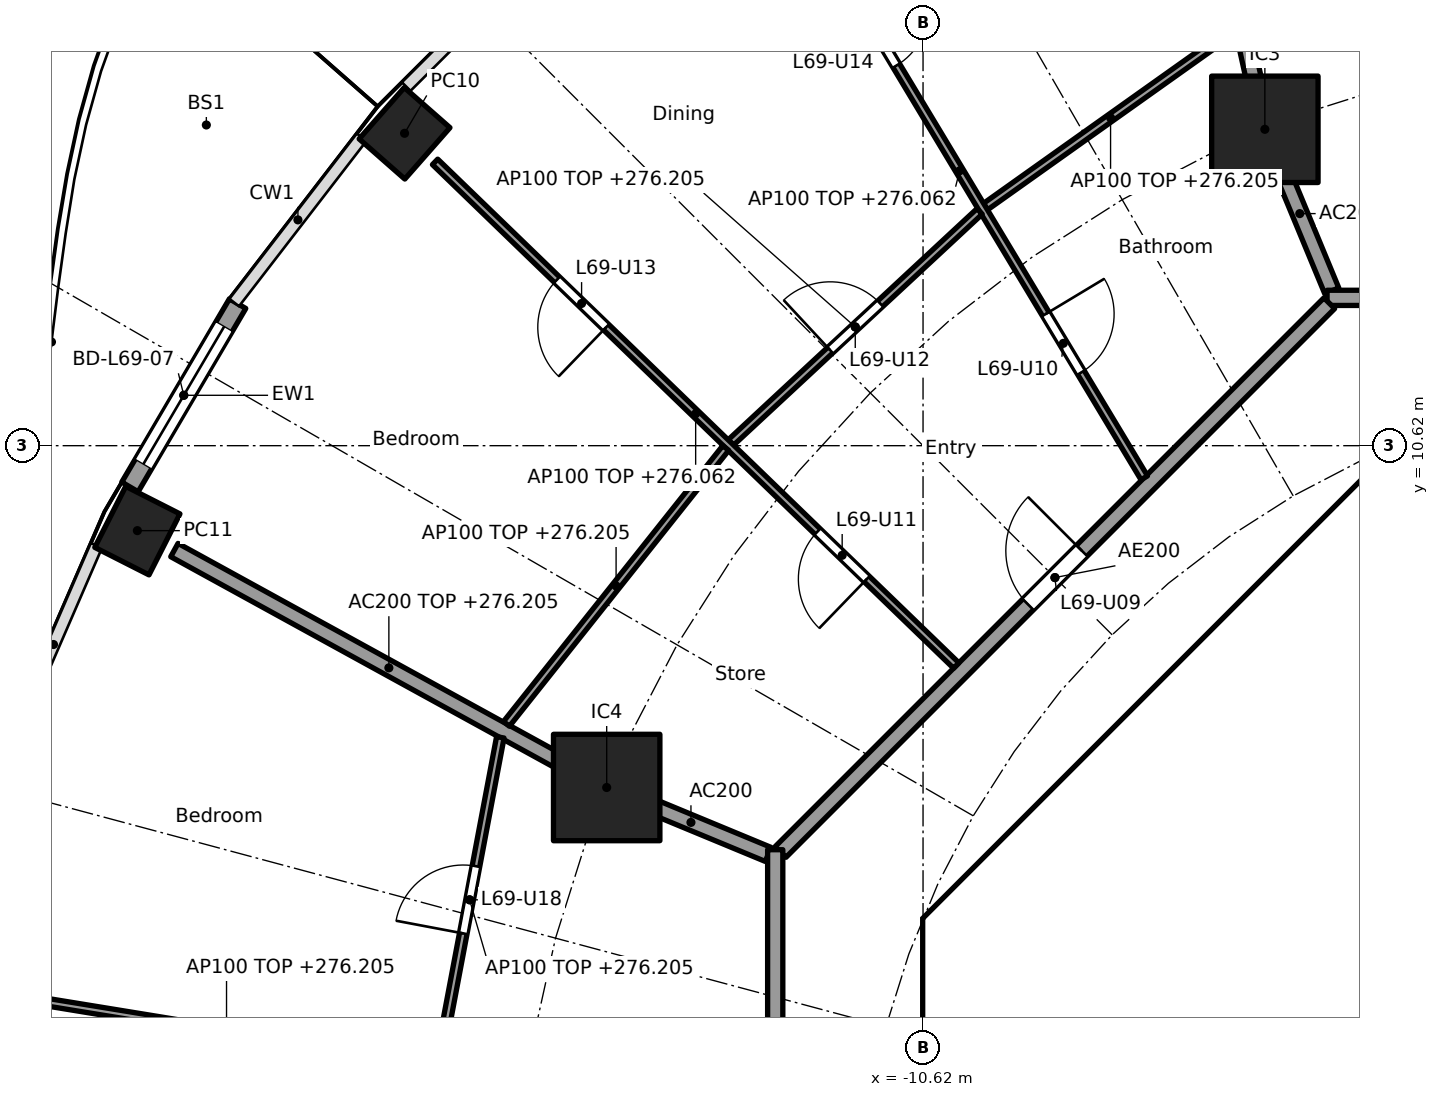
"""IFC4 building model, lengths in metres.
Left out: names, types, materials, properties, quantities, classifications, styles, units other than length and angle.
Written with IfcOpenShell. Run it as: python <this file> out.ifc"""

import sys

from ifc_helpers import new_model, si_unit, direction, frame, frame_2d, origin, origin_2d, place, context, subcontext, project, spatial, polyline, rectangle, hollow_rectangle, outline, extrude, element, fill, save


model = new_model("IFC4")
c1 = context("Model", 3, precision=1e-05, world=origin(), true_north=direction((0.0, 1.0)))
c2 = subcontext(c1, "Body", "Model", "MODEL_VIEW")
j1 = project(units=[si_unit("LENGTHUNIT", "METRE"), si_unit("PLANEANGLEUNIT", "RADIAN")], contexts=[c1])
p1 = place(None, origin())
s1 = spatial("IfcSite", under=j1, at=p1, CompositionType="ELEMENT")
p2 = place(p1, origin())
s2 = spatial("IfcBuilding", under=s1, at=p2, CompositionType="ELEMENT")
p3 = place(p2, frame((0.0, 0.0, 273.3)))
s3 = spatial("IfcBuildingStorey", under=s2, at=p3, CompositionType="ELEMENT", Elevation=273.3)
for number, where, z_axis, x_axis in (
    (1, (-17.441, 14.73, 0.0), (0.0, 0.0, 1.0), (-0.66, -0.751, 0.0)),
    (2, (-20.957, 9.502, 0.0), (0.0, 0.0, 1.0), (-0.452, -0.892, 0.0)),
):
    element("IfcColumn", number, at=place(p3, frame(where, z_axis=z_axis, x_axis=x_axis)), inside=s3, PredefinedType="COLUMN", context=c2, shape_type="SweptSolid", body=[
        extrude(hollow_rectangle(XDim=0.9, YDim=0.8, WallThickness=0.028, at=origin_2d()), origin(), (0.0, 0.0, 1.0), 3.7),
    ])
for number, where, z_axis, x_axis in (
    (3, (-6.123, 14.782, 0.0), (0.0, 0.0, 1.0), (1.0, 0.0, 0.0)),
    (4, (-14.782, 6.123, 0.0), (0.0, 0.0, 1.0), (1.0, 0.0, 0.0)),
):
    element("IfcColumn", number, at=place(p3, frame(where, z_axis=z_axis, x_axis=x_axis)), inside=s3, PredefinedType="COLUMN", context=c2, shape_type="SweptSolid", body=[
        extrude(rectangle(XDim=1.4, YDim=1.4, at=origin_2d()), origin(), (0.0, 0.0, 1.0), 3.7),
    ])
p4 = place(p3, frame((-21.054, 10.077, 0.0), z_axis=(0.0, 0.0, 1.0), x_axis=(0.506371364425, 0.862315511452, 0.0)))
e5 = element("IfcWall", 5, at=p4, inside=s3, PredefinedType="SOLIDWALL", context=c2, shape_type="SweptSolid", body=[
    extrude(rectangle(XDim=2.796, YDim=0.25, at=frame_2d((1.398, 0.0))), origin(), (0.0, 0.0, 1.0), 3.44),
])
p5 = place(p4, frame((0.348, 0.0, 0.0)))
e6 = element("IfcOpeningElement", 6, at=p5, cuts=e5, PredefinedType="OPENING", context=c2, shape_type="SweptSolid", body=[
    extrude(rectangle(XDim=2.1, YDim=2.4, at=frame_2d((1.05, 1.2))), frame((0.0, 0.135, 0.0), z_axis=(0.0, -1.0, 0.0), x_axis=(1.0, 0.0, 0.0)), (0.0, 0.0, 1.0), 0.27),
])
p6 = place(p3, frame((-4.613, 9.988, 0.0), z_axis=(0.0, 0.0, 1.0), x_axis=(-0.707106781187, -0.707106781187, 0.0)))
e7 = element("IfcWall", 7, at=p6, inside=s3, PredefinedType="SHEAR", context=c2, shape_type="SweptSolid", body=[
    extrude(rectangle(XDim=7.602, YDim=0.6, at=frame_2d((3.801, 0.0))), origin(), (0.0, 0.0, 1.0), 3.44),
])
p7 = place(p6, frame((0.351, 0.0, 0.0)))
e8 = element("IfcOpeningElement", 8, at=p7, cuts=e7, PredefinedType="OPENING", context=c2, shape_type="SweptSolid", body=[
    extrude(rectangle(XDim=1.1, YDim=2.1, at=frame_2d((0.55, 1.05))), frame((0.0, 0.31, 0.0), z_axis=(0.0, -1.0, 0.0), x_axis=(1.0, 0.0, 0.0)), (0.0, 0.0, 1.0), 0.62),
])
p8 = place(p3, frame((-10.325, 3.801, 0.0), z_axis=(0.0, 0.0, 1.0), x_axis=(0.0, -1.0, 0.0)))
e9 = element("IfcWall", 9, at=p8, inside=s3, PredefinedType="SHEAR", context=c2, shape_type="SweptSolid", body=[
    extrude(rectangle(XDim=7.602, YDim=0.6, at=frame_2d((3.801, 0.0))), origin(), (0.0, 0.0, 1.0), 3.44),
])
p9 = place(p8, frame((0.651, 0.0, 0.0)))
e10 = element("IfcOpeningElement", 10, at=p9, cuts=e9, PredefinedType="OPENING", context=c2, shape_type="SweptSolid", body=[
    extrude(rectangle(XDim=1.5, YDim=2.1, at=frame_2d((0.75, 1.05))), frame((0.0, 0.31, 0.0), z_axis=(0.0, -1.0, 0.0), x_axis=(1.0, 0.0, 0.0)), (0.0, 0.0, 1.0), 0.62),
])
p10 = place(p8, frame((5.451, 0.0, 0.0)))
e11 = element("IfcOpeningElement", 11, at=p10, cuts=e9, PredefinedType="OPENING", context=c2, shape_type="SweptSolid", body=[
    extrude(rectangle(XDim=1.5, YDim=2.1, at=frame_2d((0.75, 1.05))), frame((0.0, 0.31, 0.0), z_axis=(0.0, -1.0, 0.0), x_axis=(1.0, 0.0, 0.0)), (0.0, 0.0, 1.0), 0.62),
])
p11 = place(p3, frame((-5.8, 4.3, 0.0), z_axis=(0.0, 0.0, 1.0), x_axis=(0.0, 1.0, 0.0)))
e12 = element("IfcWall", 12, at=p11, inside=s3, PredefinedType="PARTITIONING", context=c2, shape_type="SweptSolid", body=[
    extrude(rectangle(XDim=3.927, YDim=0.15, at=frame_2d((1.963, 0.0))), origin(), (0.0, 0.0, 1.0), 3.44),
])
p12 = place(p11, frame((0.262, 0.0, 0.0)))
e13 = element("IfcOpeningElement", 13, at=p12, cuts=e12, PredefinedType="OPENING", context=c2, shape_type="SweptSolid", body=[
    extrude(rectangle(XDim=0.9, YDim=2.1, at=frame_2d((0.45, 1.05))), frame((0.0, 0.085, 0.0), z_axis=(0.0, -1.0, 0.0), x_axis=(1.0, 0.0, 0.0)), (0.0, 0.0, 1.0), 0.17),
])
p13 = place(p11, frame((2.338, 0.0, 0.0)))
e14 = element("IfcOpeningElement", 14, at=p13, cuts=e12, PredefinedType="OPENING", context=c2, shape_type="SweptSolid", body=[
    extrude(rectangle(XDim=0.9, YDim=2.1, at=frame_2d((0.45, 1.05))), frame((0.0, 0.085, 0.0), z_axis=(0.0, -1.0, 0.0), x_axis=(1.0, 0.0, 0.0)), (0.0, 0.0, 1.0), 0.17),
])
p14 = place(p3, origin())
e15 = element("IfcWall", 15, at=p14, inside=s3, PredefinedType="SHEAR", context=c2, shape_type="SweptSolid", body=[
    extrude(outline(polyline([(-10.2, 4.825), (-9.776, 4.401), (-10.025, 4.152), (-10.025, 3.801), (-10.625, 3.801), (-10.625, 4.401), (-10.2, 4.825)])), origin(), (0.0, 0.0, 1.0), 3.44),
])
p15 = place(p3, frame((-10.025, 4.0, 0.0), z_axis=(0.0, 0.0, 1.0), x_axis=(1.0, 0.0, 0.0)))
e16 = element("IfcWall", 16, at=p15, inside=s3, PredefinedType="PARTITIONING", context=c2, shape_type="SweptSolid", body=[
    extrude(rectangle(XDim=3.325, YDim=0.2, at=frame_2d((1.662, 0.0))), origin(), (0.0, 0.0, 1.0), 3.44),
])
p16 = place(p3, frame((-8.301, 5.8, 0.0), z_axis=(0.0, 0.0, 1.0), x_axis=(1.0, 0.0, 0.0)))
e17 = element("IfcWall", 17, at=p16, inside=s3, PredefinedType="PARTITIONING", context=c2, shape_type="SweptSolid", body=[
    extrude(rectangle(XDim=2.426, YDim=0.15, at=frame_2d((1.213, 0.0))), origin(), (0.0, 0.0, 1.0), 3.44),
])
p17 = place(p3, origin())
e18 = element("IfcWall", 18, at=p17, inside=s3, PredefinedType="SOLIDWALL", context=c2, shape_type="SweptSolid", body=[
    extrude(outline(polyline([(-6.7, 4.3), (6.7, 4.3), (6.7, 2.1), (6.5, 2.1), (6.5, 4.1), (4.5, 4.1), (4.5, 2.1), (4.3, 2.1), (4.3, 4.1), (2.3, 4.1), (2.3, 2.1), (2.1, 2.1), (2.1, 4.1), (0.1, 4.1), (0.1, 2.1), (-0.1, 2.1), (-0.1, 4.1), (-4.3, 4.1), (-4.3, 2.1), (-4.5, 2.1), (-4.5, 4.1), (-6.5, 4.1), (-6.5, 2.1), (-6.7, 2.1), (-6.7, 4.3)])), origin(), (0.0, 0.0, 1.0), 3.44),
])
p18 = place(p3, frame((-5.243, 12.657, 0.0), z_axis=(0.0, 0.0, 1.0), x_axis=(-0.38273085373, 0.923859888513, 0.0)))
e19 = element("IfcWall", 19, at=p18, inside=s3, PredefinedType="PARTITIONING", context=c2, shape_type="SweptSolid", body=[
    extrude(rectangle(XDim=2.199, YDim=0.2, at=frame_2d((1.1, 0.0))), origin(), (0.0, 0.0, 1.0), 3.44),
])
p19 = place(p3, frame((-6.134, 14.831, 0.0), z_axis=(0.0, 0.0, 1.0), x_axis=(-0.214842475666, 0.976648714047, 0.0)))
e20 = element("IfcWall", 20, at=p19, inside=s3, PredefinedType="PARTITIONING", context=c2, shape_type="SweptSolid", body=[
    extrude(rectangle(XDim=6.031, YDim=0.2, at=frame_2d((3.015, 0.0))), origin(), (0.0, 0.0, 1.0), 2.905),
])
p20 = place(p3, frame((-12.657, 5.243, 0.0), z_axis=(0.0, 0.0, 1.0), x_axis=(-0.923869415315, 0.382707856524, 0.0)))
e21 = element("IfcWall", 21, at=p20, inside=s3, PredefinedType="PARTITIONING", context=c2, shape_type="SweptSolid", body=[
    extrude(rectangle(XDim=2.2, YDim=0.2, at=frame_2d((1.1, 0.0))), origin(), (0.0, 0.0, 1.0), 3.44),
])
p21 = place(p3, frame((-14.826, 6.147, 0.0), z_axis=(0.0, 0.0, 1.0), x_axis=(-0.876484755865, 0.481429613481, 0.0)))
e22 = element("IfcWall", 22, at=p21, inside=s3, PredefinedType="PARTITIONING", context=c2, shape_type="SweptSolid", body=[
    extrude(rectangle(XDim=6.439, YDim=0.2, at=frame_2d((3.219, 0.0))), origin(), (0.0, 0.0, 1.0), 2.905),
])
p22 = place(p3, frame((5.104, 12.565, 0.0), z_axis=(0.0, 0.0, 1.0), x_axis=(-1.0, 0.0, 0.0)))
e23 = element("IfcWall", 23, at=p22, inside=s3, PredefinedType="PARTITIONING", context=c2, shape_type="SweptSolid", body=[
    extrude(rectangle(XDim=10.409, YDim=0.2, at=frame_2d((5.205, 0.0))), origin(), (0.0, 0.0, 1.0), 3.44),
])
p23 = place(p22, frame((4.604, 0.0, 0.0)))
e24 = element("IfcOpeningElement", 24, at=p23, cuts=e23, PredefinedType="OPENING", context=c2, shape_type="SweptSolid", body=[
    extrude(rectangle(XDim=1.0, YDim=2.1, at=frame_2d((0.5, 1.05))), frame((0.0, 0.11, 0.0), z_axis=(0.0, -1.0, 0.0), x_axis=(1.0, 0.0, 0.0)), (0.0, 0.0, 1.0), 0.22),
])
p24 = place(p3, frame((-5.275, 12.494, 0.0), z_axis=(0.0, 0.0, 1.0), x_axis=(-0.707106781187, -0.707106781187, 0.0)))
e25 = element("IfcWall", 25, at=p24, inside=s3, PredefinedType="PARTITIONING", context=c2, shape_type="SweptSolid", body=[
    extrude(rectangle(XDim=10.209, YDim=0.2, at=frame_2d((5.104, 0.0))), origin(), (0.0, 0.0, 1.0), 3.44),
])
p25 = place(p24, frame((4.604, 0.0, 0.0)))
e26 = element("IfcOpeningElement", 26, at=p25, cuts=e25, PredefinedType="OPENING", context=c2, shape_type="SweptSolid", body=[
    extrude(rectangle(XDim=1.0, YDim=2.1, at=frame_2d((0.5, 1.05))), frame((0.0, 0.11, 0.0), z_axis=(0.0, -1.0, 0.0), x_axis=(1.0, 0.0, 0.0)), (0.0, 0.0, 1.0), 0.22),
])
p26 = place(p3, frame((-12.565, 5.304, 0.0), z_axis=(0.0, 0.0, 1.0), x_axis=(0.0, -1.0, 0.0)))
e27 = element("IfcWall", 27, at=p26, inside=s3, PredefinedType="PARTITIONING", context=c2, shape_type="SweptSolid", body=[
    extrude(rectangle(XDim=10.409, YDim=0.2, at=frame_2d((5.205, 0.0))), origin(), (0.0, 0.0, 1.0), 3.44),
])
p27 = place(p26, frame((6.539, 0.0, 0.0)))
e28 = element("IfcOpeningElement", 28, at=p27, cuts=e27, PredefinedType="OPENING", context=c2, shape_type="SweptSolid", body=[
    extrude(rectangle(XDim=1.0, YDim=2.1, at=frame_2d((0.5, 1.05))), frame((0.0, 0.11, 0.0), z_axis=(0.0, -1.0, 0.0), x_axis=(1.0, 0.0, 0.0)), (0.0, 0.0, 1.0), 0.22),
])
p28 = place(p3, frame((-6.508, 16.103, 0.0), z_axis=(0.0, 0.0, 1.0), x_axis=(-0.815202203556, -0.579176456114, 0.0)))
e29 = element("IfcWall", 29, at=p28, inside=s3, PredefinedType="PARTITIONING", context=c2, shape_type="SweptSolid", body=[
    extrude(rectangle(XDim=4.036, YDim=0.1, at=frame_2d((2.018, 0.0))), origin(), (0.0, 0.0, 1.0), 2.905),
])
p29 = place(p3, frame((-7.709, 10.197, 0.0), z_axis=(0.0, 0.0, 1.0), x_axis=(-0.515516160663, 0.856879856278, 0.0)))
e30 = element("IfcWall", 30, at=p29, inside=s3, PredefinedType="PARTITIONING", context=c2, shape_type="SweptSolid", body=[
    extrude(rectangle(XDim=9.426, YDim=0.1, at=frame_2d((4.713, 0.0))), origin(), (0.0, 0.0, 1.0), 2.762),
])
p30 = place(p29, frame((1.615, 0.0, 0.0)))
e31 = element("IfcOpeningElement", 31, at=p30, cuts=e30, PredefinedType="OPENING", context=c2, shape_type="SweptSolid", body=[
    extrude(rectangle(XDim=0.9, YDim=2.1, at=frame_2d((0.45, 1.05))), frame((0.0, 0.06, 0.0), z_axis=(0.0, -1.0, 0.0), x_axis=(1.0, 0.0, 0.0)), (0.0, 0.0, 1.0), 0.12),
])
p31 = place(p29, frame((6.328, 0.0, 0.0)))
e32 = element("IfcOpeningElement", 32, at=p31, cuts=e30, PredefinedType="OPENING", context=c2, shape_type="SweptSolid", body=[
    extrude(rectangle(XDim=0.9, YDim=2.1, at=frame_2d((0.45, 1.05))), frame((0.0, 0.06, 0.0), z_axis=(0.0, -1.0, 0.0), x_axis=(1.0, 0.0, 0.0)), (0.0, 0.0, 1.0), 0.12),
])
p32 = place(p3, frame((-9.875, 13.702, 0.0), z_axis=(0.0, 0.0, 1.0), x_axis=(-0.732618266441, -0.680639754699, 0.0)))
e33 = element("IfcWall", 33, at=p32, inside=s3, PredefinedType="PARTITIONING", context=c2, shape_type="SweptSolid", body=[
    extrude(rectangle(XDim=4.467, YDim=0.1, at=frame_2d((2.233, 0.0))), origin(), (0.0, 0.0, 1.0), 2.905),
])
p33 = place(p32, frame((1.783, 0.0, 0.0)))
e34 = element("IfcOpeningElement", 34, at=p33, cuts=e33, PredefinedType="OPENING", context=c2, shape_type="SweptSolid", body=[
    extrude(rectangle(XDim=0.9, YDim=2.1, at=frame_2d((0.45, 1.05))), frame((0.0, 0.06, 0.0), z_axis=(0.0, -1.0, 0.0), x_axis=(1.0, 0.0, 0.0)), (0.0, 0.0, 1.0), 0.12),
])
p34 = place(p3, frame((-10.183, 7.727, 0.0), z_axis=(0.0, 0.0, 1.0), x_axis=(-0.719063433856, 0.694944442449, 0.0)))
e35 = element("IfcWall", 35, at=p34, inside=s3, PredefinedType="PARTITIONING", context=c2, shape_type="SweptSolid", body=[
    extrude(rectangle(XDim=9.535, YDim=0.1, at=frame_2d((4.768, 0.0))), origin(), (0.0, 0.0, 1.0), 2.762),
])
p35 = place(p34, frame((1.637, 0.0, 0.0)))
e36 = element("IfcOpeningElement", 36, at=p35, cuts=e35, PredefinedType="OPENING", context=c2, shape_type="SweptSolid", body=[
    extrude(rectangle(XDim=0.9, YDim=2.1, at=frame_2d((0.45, 1.05))), frame((0.0, 0.06, 0.0), z_axis=(0.0, -1.0, 0.0), x_axis=(1.0, 0.0, 0.0)), (0.0, 0.0, 1.0), 0.12),
])
p36 = place(p34, frame((6.405, 0.0, 0.0)))
e37 = element("IfcOpeningElement", 37, at=p36, cuts=e35, PredefinedType="OPENING", context=c2, shape_type="SweptSolid", body=[
    extrude(rectangle(XDim=0.9, YDim=2.1, at=frame_2d((0.45, 1.05))), frame((0.0, 0.06, 0.0), z_axis=(0.0, -1.0, 0.0), x_axis=(1.0, 0.0, 0.0)), (0.0, 0.0, 1.0), 0.12),
])
p37 = place(p3, frame((-13.216, 10.589, 0.0), z_axis=(0.0, 0.0, 1.0), x_axis=(-0.622251572882, -0.782817335045, 0.0)))
e38 = element("IfcWall", 38, at=p37, inside=s3, PredefinedType="PARTITIONING", context=c2, shape_type="SweptSolid", body=[
    extrude(rectangle(XDim=4.636, YDim=0.1, at=frame_2d((2.318, 0.0))), origin(), (0.0, 0.0, 1.0), 2.905),
])
p38 = place(p3, frame((-16.181, 6.783, 0.0), z_axis=(0.0, 0.0, 1.0), x_axis=(-0.185670583745, -0.982612046706, 0.0)))
e39 = element("IfcWall", 39, at=p38, inside=s3, PredefinedType="PARTITIONING", context=c2, shape_type="SweptSolid", body=[
    extrude(rectangle(XDim=4.351, YDim=0.1, at=frame_2d((2.176, 0.0))), origin(), (0.0, 0.0, 1.0), 2.905),
])
p39 = place(p38, frame((1.726, 0.0, 0.0)))
e40 = element("IfcOpeningElement", 40, at=p39, cuts=e39, PredefinedType="OPENING", context=c2, shape_type="SweptSolid", body=[
    extrude(rectangle(XDim=0.9, YDim=2.1, at=frame_2d((0.45, 1.05))), frame((0.0, 0.06, 0.0), z_axis=(0.0, -1.0, 0.0), x_axis=(1.0, 0.0, 0.0)), (0.0, 0.0, 1.0), 0.12),
])
p40 = place(p3, frame((-16.949, 2.451, 0.0), z_axis=(0.0, 0.0, 1.0), x_axis=(-0.986937570833, 0.161103169673, 0.0)))
e41 = element("IfcWall", 41, at=p40, inside=s3, PredefinedType="PARTITIONING", context=c2, shape_type="SweptSolid", body=[
    extrude(rectangle(XDim=5.743, YDim=0.1, at=frame_2d((2.872, 0.0))), origin(), (0.0, 0.0, 1.0), 2.905),
])
p41 = place(p5, origin())
e42 = element("IfcDoor", 42, at=p41, inside=s3, OperationType="SLIDING_TO_LEFT", PredefinedType="DOOR", context=c2, shape_type="SweptSolid", body=[
    extrude(rectangle(XDim=2.1, YDim=2.4, at=frame_2d((1.05, 1.2))), frame((0.0, 0.025, 0.0), z_axis=(0.0, -1.0, 0.0), x_axis=(1.0, 0.0, 0.0)), (0.0, 0.0, 1.0), 0.05),
])
fill(e6, e42)
p42 = place(p12, origin())
e43 = element("IfcDoor", 43, at=p42, inside=s3, OperationType="SINGLE_SWING_RIGHT", PredefinedType="DOOR", context=c2, shape_type="SweptSolid", body=[
    extrude(rectangle(XDim=0.9, YDim=2.1, at=frame_2d((0.45, 1.05))), frame((0.0, 0.025, 0.0), z_axis=(0.0, -1.0, 0.0), x_axis=(1.0, 0.0, 0.0)), (0.0, 0.0, 1.0), 0.05),
])
fill(e13, e43)
p43 = place(p13, origin())
e44 = element("IfcDoor", 44, at=p43, inside=s3, OperationType="SINGLE_SWING_RIGHT", PredefinedType="DOOR", context=c2, shape_type="SweptSolid", body=[
    extrude(rectangle(XDim=0.9, YDim=2.1, at=frame_2d((0.45, 1.05))), frame((0.0, 0.025, 0.0), z_axis=(0.0, -1.0, 0.0), x_axis=(1.0, 0.0, 0.0)), (0.0, 0.0, 1.0), 0.05),
])
fill(e14, e44)
p44 = place(p9, origin())
e45 = element("IfcDoor", 45, at=p44, inside=s3, OperationType="DOUBLE_DOOR_SINGLE_SWING", PredefinedType="DOOR", context=c2, shape_type="SweptSolid", body=[
    extrude(rectangle(XDim=1.5, YDim=2.1, at=frame_2d((0.75, 1.05))), frame((0.0, 0.025, 0.0), z_axis=(0.0, -1.0, 0.0), x_axis=(1.0, 0.0, 0.0)), (0.0, 0.0, 1.0), 0.05),
])
fill(e10, e45)
p45 = place(p7, origin())
e46 = element("IfcDoor", 46, at=p45, inside=s3, OperationType="SINGLE_SWING_RIGHT", PredefinedType="DOOR", context=c2, shape_type="SweptSolid", body=[
    extrude(rectangle(XDim=1.1, YDim=2.1, at=frame_2d((0.55, 1.05))), frame((0.0, 0.025, 0.0), z_axis=(0.0, -1.0, 0.0), x_axis=(1.0, 0.0, 0.0)), (0.0, 0.0, 1.0), 0.05),
])
fill(e8, e46)
p46 = place(p25, frame((1.0, 0.0, 0.0), x_axis=(-1.0, 0.0, 0.0)))
e47 = element("IfcDoor", 47, at=p46, inside=s3, OperationType="SINGLE_SWING_RIGHT", PredefinedType="DOOR", context=c2, shape_type="SweptSolid", body=[
    extrude(rectangle(XDim=1.0, YDim=2.1, at=frame_2d((0.5, 1.05))), frame((0.0, 0.025, 0.0), z_axis=(0.0, -1.0, 0.0), x_axis=(1.0, 0.0, 0.0)), (0.0, 0.0, 1.0), 0.05),
])
fill(e26, e47)
p47 = place(p30, frame((0.9, 0.0, 0.0), x_axis=(-1.0, 0.0, 0.0)))
e48 = element("IfcDoor", 48, at=p47, inside=s3, OperationType="SINGLE_SWING_LEFT", PredefinedType="DOOR", context=c2, shape_type="SweptSolid", body=[
    extrude(rectangle(XDim=0.9, YDim=2.1, at=frame_2d((0.45, 1.05))), frame((0.0, 0.025, 0.0), z_axis=(0.0, -1.0, 0.0), x_axis=(1.0, 0.0, 0.0)), (0.0, 0.0, 1.0), 0.05),
])
fill(e31, e48)
p48 = place(p35, origin())
e49 = element("IfcDoor", 49, at=p48, inside=s3, OperationType="SINGLE_SWING_LEFT", PredefinedType="DOOR", context=c2, shape_type="SweptSolid", body=[
    extrude(rectangle(XDim=0.9, YDim=2.1, at=frame_2d((0.45, 1.05))), frame((0.0, 0.025, 0.0), z_axis=(0.0, -1.0, 0.0), x_axis=(1.0, 0.0, 0.0)), (0.0, 0.0, 1.0), 0.05),
])
fill(e36, e49)
p49 = place(p33, frame((0.9, 0.0, 0.0), x_axis=(-1.0, 0.0, 0.0)))
e50 = element("IfcDoor", 50, at=p49, inside=s3, OperationType="SINGLE_SWING_LEFT", PredefinedType="DOOR", context=c2, shape_type="SweptSolid", body=[
    extrude(rectangle(XDim=0.9, YDim=2.1, at=frame_2d((0.45, 1.05))), frame((0.0, 0.025, 0.0), z_axis=(0.0, -1.0, 0.0), x_axis=(1.0, 0.0, 0.0)), (0.0, 0.0, 1.0), 0.05),
])
fill(e34, e50)
p50 = place(p36, origin())
e51 = element("IfcDoor", 51, at=p50, inside=s3, OperationType="SINGLE_SWING_LEFT", PredefinedType="DOOR", context=c2, shape_type="SweptSolid", body=[
    extrude(rectangle(XDim=0.9, YDim=2.1, at=frame_2d((0.45, 1.05))), frame((0.0, 0.025, 0.0), z_axis=(0.0, -1.0, 0.0), x_axis=(1.0, 0.0, 0.0)), (0.0, 0.0, 1.0), 0.05),
])
fill(e37, e51)
p51 = place(p31, frame((0.9, 0.0, 0.0), x_axis=(-1.0, 0.0, 0.0)))
e52 = element("IfcDoor", 52, at=p51, inside=s3, OperationType="SINGLE_SWING_LEFT", PredefinedType="DOOR", context=c2, shape_type="SweptSolid", body=[
    extrude(rectangle(XDim=0.9, YDim=2.1, at=frame_2d((0.45, 1.05))), frame((0.0, 0.025, 0.0), z_axis=(0.0, -1.0, 0.0), x_axis=(1.0, 0.0, 0.0)), (0.0, 0.0, 1.0), 0.05),
])
fill(e32, e52)
p52 = place(p39, frame((0.9, 0.0, 0.0), x_axis=(-1.0, 0.0, 0.0)))
e53 = element("IfcDoor", 53, at=p52, inside=s3, OperationType="SINGLE_SWING_LEFT", PredefinedType="DOOR", context=c2, shape_type="SweptSolid", body=[
    extrude(rectangle(XDim=0.9, YDim=2.1, at=frame_2d((0.45, 1.05))), frame((0.0, 0.025, 0.0), z_axis=(0.0, -1.0, 0.0), x_axis=(1.0, 0.0, 0.0)), (0.0, 0.0, 1.0), 0.05),
])
fill(e40, e53)
save(model, sys.argv[1])
